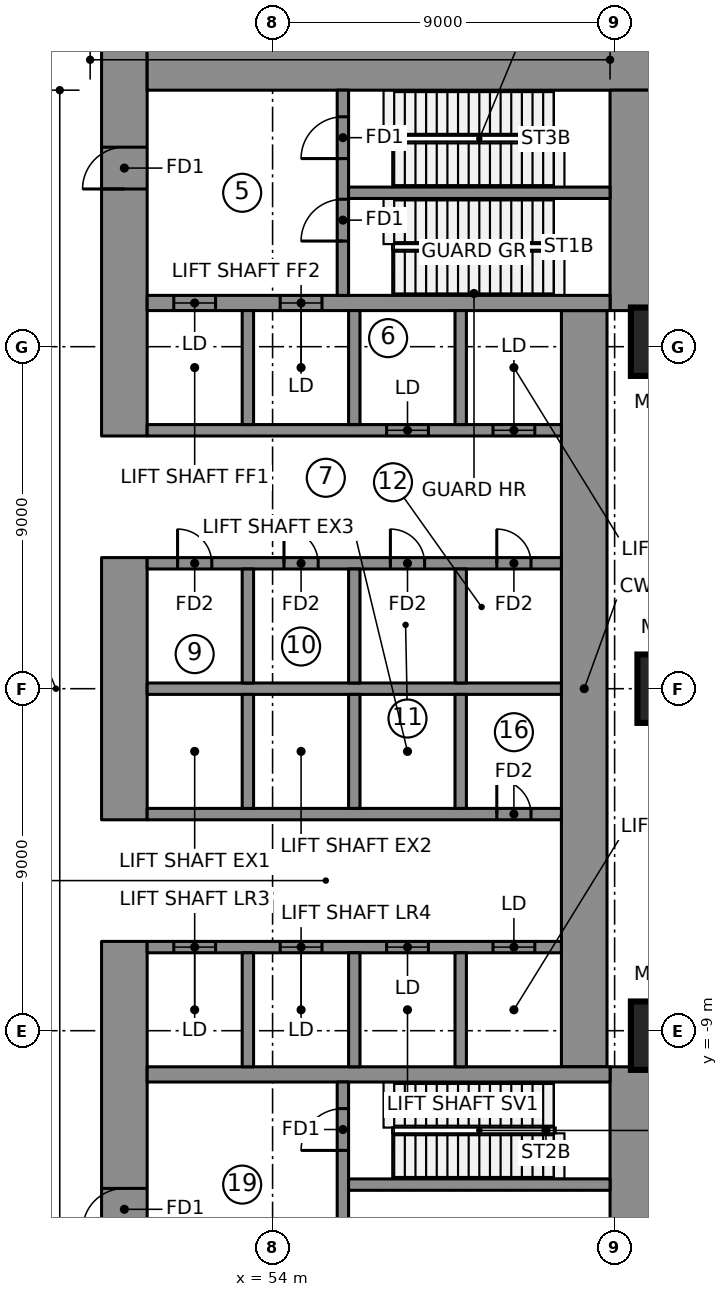
"""IFC4 building model, lengths in metres.
Left out: names, types, materials, properties, quantities, classifications, styles, units other than length and angle.
Written with IfcOpenShell. Run it as: python <this file> out.ifc"""

import sys

from ifc_helpers import new_model, si_unit, direction, frame, frame_2d, origin, origin_2d, place, context, subcontext, project, spatial, rectangle, extrude, element, fill, save


model = new_model("IFC4")
c1 = context("Model", 3, precision=1e-05, world=origin(), true_north=direction((0.0, 1.0)))
c2 = subcontext(c1, "Body", "Model", "MODEL_VIEW")
j1 = project(units=[si_unit("LENGTHUNIT", "METRE"), si_unit("PLANEANGLEUNIT", "RADIAN")], contexts=[c1])
p1 = place(None, origin())
s1 = spatial("IfcSite", under=j1, at=p1, CompositionType="ELEMENT")
p2 = place(p1, origin())
s2 = spatial("IfcBuilding", under=s1, at=p2, CompositionType="ELEMENT")
p3 = place(p2, frame((0.0, 0.0, 8.0)))
s3 = spatial("IfcBuildingStorey", under=s2, at=p3, CompositionType="ELEMENT", Elevation=8.0)
p4 = place(p3, frame((50.1, 6.65, 0.0), z_axis=(0.0, 0.0, 1.0), x_axis=(0.0, 1.0, 0.0)))
e1 = element("IfcWall", 1, at=p4, inside=s3, PredefinedType="SHEAR", context=c2, shape_type="SweptSolid", body=[
    extrude(rectangle(XDim=10.3, YDim=1.2, at=frame_2d((5.15, 0.0))), origin(), (0.0, 0.0, 1.0), 5.5),
])
p5 = place(p4, frame((6.5, 0.0, 0.0)))
e2 = element("IfcOpeningElement", 2, at=p5, cuts=e1, PredefinedType="OPENING", context=c2, shape_type="SweptSolid", body=[
    extrude(rectangle(XDim=1.1, YDim=2.1, at=frame_2d((0.55, 1.05))), frame((0.0, 0.61, 0.0), z_axis=(0.0, -1.0, 0.0), x_axis=(1.0, 0.0, 0.0)), (0.0, 0.0, 1.0), 1.22),
])
p6 = place(p3, frame((50.1, -3.45, 0.0), z_axis=(0.0, 0.0, 1.0), x_axis=(0.0, 1.0, 0.0)))
e3 = element("IfcWall", 3, at=p6, inside=s3, PredefinedType="SHEAR", context=c2, shape_type="SweptSolid", body=[
    extrude(rectangle(XDim=6.9, YDim=1.2, at=frame_2d((3.45, 0.0))), origin(), (0.0, 0.0, 1.0), 5.5),
])
p7 = place(p3, frame((50.1, -16.95, 0.0), z_axis=(0.0, 0.0, 1.0), x_axis=(0.0, 1.0, 0.0)))
e4 = element("IfcWall", 4, at=p7, inside=s3, PredefinedType="SHEAR", context=c2, shape_type="SweptSolid", body=[
    extrude(rectangle(XDim=10.3, YDim=1.2, at=frame_2d((5.15, 0.0))), origin(), (0.0, 0.0, 1.0), 5.5),
])
p8 = place(p7, frame((2.7, 0.0, 0.0)))
e5 = element("IfcOpeningElement", 5, at=p8, cuts=e4, PredefinedType="OPENING", context=c2, shape_type="SweptSolid", body=[
    extrude(rectangle(XDim=1.1, YDim=2.1, at=frame_2d((0.55, 1.05))), frame((0.0, 0.61, 0.0), z_axis=(0.0, -1.0, 0.0), x_axis=(1.0, 0.0, 0.0)), (0.0, 0.0, 1.0), 1.22),
])
p9 = place(p3, frame((50.7, 16.35, 0.0), z_axis=(0.0, 0.0, 1.0), x_axis=(1.0, 0.0, 0.0)))
e6 = element("IfcWall", 6, at=p9, inside=s3, PredefinedType="SHEAR", context=c2, shape_type="SweptSolid", body=[
    extrude(rectangle(XDim=13.38, YDim=1.2, at=frame_2d((6.69, 0.0))), origin(), (0.0, 0.0, 1.0), 5.5),
])
for number, where, z_axis, x_axis in (
    (7, (63.48, 9.95, 0.0), (0.0, 0.0, 1.0), (0.0, 1.0, 0.0)),
    (8, (63.48, -15.75, 0.0), (0.0, 0.0, 1.0), (0.0, 1.0, 0.0)),
):
    element("IfcWall", number, at=place(p3, frame(where, z_axis=z_axis, x_axis=x_axis)), inside=s3, PredefinedType="SHEAR", context=c2, shape_type="SweptSolid", body=[
        extrude(rectangle(XDim=5.8, YDim=1.2, at=frame_2d((2.9, 0.0))), origin(), (0.0, 0.0, 1.0), 5.5),
    ])
p10 = place(p3, frame((62.2, -9.95, 0.0), z_axis=(0.0, 0.0, 1.0), x_axis=(0.0, 1.0, 0.0)))
e9 = element("IfcWall", 9, at=p10, inside=s3, PredefinedType="SHEAR", context=c2, shape_type="SweptSolid", body=[
    extrude(rectangle(XDim=19.9, YDim=1.2, at=frame_2d((9.95, 0.0))), origin(), (0.0, 0.0, 1.0), 5.5),
])
p11 = place(p3, frame((50.7, 10.15, 0.0), z_axis=(0.0, 0.0, 1.0), x_axis=(1.0, 0.0, 0.0)))
e10 = element("IfcWall", 10, at=p11, inside=s3, PredefinedType="SHEAR", context=c2, shape_type="SweptSolid", body=[
    extrude(rectangle(XDim=12.18, YDim=0.4, at=frame_2d((6.09, 0.0))), origin(), (0.0, 0.0, 1.0), 5.5),
])
p12 = place(p11, frame((0.7, 0.0, 0.0)))
e11 = element("IfcOpeningElement", 11, at=p12, cuts=e10, PredefinedType="OPENING", context=c2, shape_type="SweptSolid", body=[
    extrude(rectangle(XDim=1.1, YDim=2.1, at=frame_2d((0.55, 1.05))), frame((0.0, 0.21, 0.0), z_axis=(0.0, -1.0, 0.0), x_axis=(1.0, 0.0, 0.0)), (0.0, 0.0, 1.0), 0.42),
])
p13 = place(p11, frame((3.5, 0.0, 0.0)))
e12 = element("IfcOpeningElement", 12, at=p13, cuts=e10, PredefinedType="OPENING", context=c2, shape_type="SweptSolid", body=[
    extrude(rectangle(XDim=1.1, YDim=2.1, at=frame_2d((0.55, 1.05))), frame((0.0, 0.21, 0.0), z_axis=(0.0, -1.0, 0.0), x_axis=(1.0, 0.0, 0.0)), (0.0, 0.0, 1.0), 0.42),
])
p14 = place(p3, frame((50.7, -10.15, 0.0), z_axis=(0.0, 0.0, 1.0), x_axis=(1.0, 0.0, 0.0)))
e13 = element("IfcWall", 13, at=p14, inside=s3, PredefinedType="SHEAR", context=c2, shape_type="SweptSolid", body=[
    extrude(rectangle(XDim=12.18, YDim=0.4, at=frame_2d((6.09, 0.0))), origin(), (0.0, 0.0, 1.0), 5.5),
])
p15 = place(p3, frame((50.7, 0.0, 0.0), z_axis=(0.0, 0.0, 1.0), x_axis=(1.0, 0.0, 0.0)))
e14 = element("IfcWall", 14, at=p15, inside=s3, PredefinedType="SHEAR", context=c2, shape_type="SweptSolid", body=[
    extrude(rectangle(XDim=10.9, YDim=0.3, at=frame_2d((5.45, 0.0))), origin(), (0.0, 0.0, 1.0), 5.5),
])
p16 = place(p3, frame((50.7, 3.3, 0.0), z_axis=(0.0, 0.0, 1.0), x_axis=(1.0, 0.0, 0.0)))
e15 = element("IfcWall", 15, at=p16, inside=s3, PredefinedType="SHEAR", context=c2, shape_type="SweptSolid", body=[
    extrude(rectangle(XDim=10.9, YDim=0.3, at=frame_2d((5.45, 0.0))), origin(), (0.0, 0.0, 1.0), 5.5),
])
p17 = place(p16, frame((0.8, 0.0, 0.0)))
e16 = element("IfcOpeningElement", 16, at=p17, cuts=e15, PredefinedType="OPENING", context=c2, shape_type="SweptSolid", body=[
    extrude(rectangle(XDim=0.9, YDim=2.1, at=frame_2d((0.45, 1.05))), frame((0.0, 0.16, 0.0), z_axis=(0.0, -1.0, 0.0), x_axis=(1.0, 0.0, 0.0)), (0.0, 0.0, 1.0), 0.32),
])
p18 = place(p16, frame((3.6, 0.0, 0.0)))
e17 = element("IfcOpeningElement", 17, at=p18, cuts=e15, PredefinedType="OPENING", context=c2, shape_type="SweptSolid", body=[
    extrude(rectangle(XDim=0.9, YDim=2.1, at=frame_2d((0.45, 1.05))), frame((0.0, 0.16, 0.0), z_axis=(0.0, -1.0, 0.0), x_axis=(1.0, 0.0, 0.0)), (0.0, 0.0, 1.0), 0.32),
])
p19 = place(p16, frame((6.4, 0.0, 0.0)))
e18 = element("IfcOpeningElement", 18, at=p19, cuts=e15, PredefinedType="OPENING", context=c2, shape_type="SweptSolid", body=[
    extrude(rectangle(XDim=0.9, YDim=2.1, at=frame_2d((0.45, 1.05))), frame((0.0, 0.16, 0.0), z_axis=(0.0, -1.0, 0.0), x_axis=(1.0, 0.0, 0.0)), (0.0, 0.0, 1.0), 0.32),
])
p20 = place(p16, frame((9.2, 0.0, 0.0)))
e19 = element("IfcOpeningElement", 19, at=p20, cuts=e15, PredefinedType="OPENING", context=c2, shape_type="SweptSolid", body=[
    extrude(rectangle(XDim=0.9, YDim=2.1, at=frame_2d((0.45, 1.05))), frame((0.0, 0.16, 0.0), z_axis=(0.0, -1.0, 0.0), x_axis=(1.0, 0.0, 0.0)), (0.0, 0.0, 1.0), 0.32),
])
p21 = place(p3, frame((50.7, 6.8, 0.0), z_axis=(0.0, 0.0, 1.0), x_axis=(1.0, 0.0, 0.0)))
e20 = element("IfcWall", 20, at=p21, inside=s3, PredefinedType="SHEAR", context=c2, shape_type="SweptSolid", body=[
    extrude(rectangle(XDim=10.9, YDim=0.3, at=frame_2d((5.45, 0.0))), origin(), (0.0, 0.0, 1.0), 5.5),
])
p22 = place(p21, frame((6.3, 0.0, 0.0)))
e21 = element("IfcOpeningElement", 21, at=p22, cuts=e20, PredefinedType="OPENING", context=c2, shape_type="SweptSolid", body=[
    extrude(rectangle(XDim=1.1, YDim=2.1, at=frame_2d((0.55, 1.05))), frame((0.0, 0.16, 0.0), z_axis=(0.0, -1.0, 0.0), x_axis=(1.0, 0.0, 0.0)), (0.0, 0.0, 1.0), 0.32),
])
p23 = place(p21, frame((9.1, 0.0, 0.0)))
e22 = element("IfcOpeningElement", 22, at=p23, cuts=e20, PredefinedType="OPENING", context=c2, shape_type="SweptSolid", body=[
    extrude(rectangle(XDim=1.1, YDim=2.1, at=frame_2d((0.55, 1.05))), frame((0.0, 0.16, 0.0), z_axis=(0.0, -1.0, 0.0), x_axis=(1.0, 0.0, 0.0)), (0.0, 0.0, 1.0), 0.32),
])
for number, where, z_axis, x_axis in (
    (23, (53.35, 0.15, 0.0), (0.0, 0.0, 1.0), (0.0, 1.0, 0.0)),
    (24, (53.35, 6.95, 0.0), (0.0, 0.0, 1.0), (0.0, 1.0, 0.0)),
    (25, (56.15, 0.15, 0.0), (0.0, 0.0, 1.0), (0.0, 1.0, 0.0)),
    (26, (56.15, 6.95, 0.0), (0.0, 0.0, 1.0), (0.0, 1.0, 0.0)),
    (27, (58.95, 0.15, 0.0), (0.0, 0.0, 1.0), (0.0, 1.0, 0.0)),
    (28, (58.95, 6.95, 0.0), (0.0, 0.0, 1.0), (0.0, 1.0, 0.0)),
):
    element("IfcWall", number, at=place(p3, frame(where, z_axis=z_axis, x_axis=x_axis)), inside=s3, PredefinedType="SHEAR", context=c2, shape_type="SweptSolid", body=[
        extrude(rectangle(XDim=3.0, YDim=0.3, at=frame_2d((1.5, 0.0))), origin(), (0.0, 0.0, 1.0), 5.5),
    ])
p24 = place(p3, frame((50.7, -3.3, 0.0), z_axis=(0.0, 0.0, 1.0), x_axis=(1.0, 0.0, 0.0)))
e29 = element("IfcWall", 29, at=p24, inside=s3, PredefinedType="SHEAR", context=c2, shape_type="SweptSolid", body=[
    extrude(rectangle(XDim=10.9, YDim=0.3, at=frame_2d((5.45, 0.0))), origin(), (0.0, 0.0, 1.0), 5.5),
])
p25 = place(p24, frame((9.2, 0.0, 0.0)))
e30 = element("IfcOpeningElement", 30, at=p25, cuts=e29, PredefinedType="OPENING", context=c2, shape_type="SweptSolid", body=[
    extrude(rectangle(XDim=0.9, YDim=2.1, at=frame_2d((0.45, 1.05))), frame((0.0, 0.16, 0.0), z_axis=(0.0, -1.0, 0.0), x_axis=(1.0, 0.0, 0.0)), (0.0, 0.0, 1.0), 0.32),
])
p26 = place(p3, frame((50.7, -6.8, 0.0), z_axis=(0.0, 0.0, 1.0), x_axis=(1.0, 0.0, 0.0)))
e31 = element("IfcWall", 31, at=p26, inside=s3, PredefinedType="SHEAR", context=c2, shape_type="SweptSolid", body=[
    extrude(rectangle(XDim=10.9, YDim=0.3, at=frame_2d((5.45, 0.0))), origin(), (0.0, 0.0, 1.0), 5.5),
])
p27 = place(p26, frame((0.7, 0.0, 0.0)))
e32 = element("IfcOpeningElement", 32, at=p27, cuts=e31, PredefinedType="OPENING", context=c2, shape_type="SweptSolid", body=[
    extrude(rectangle(XDim=1.1, YDim=2.1, at=frame_2d((0.55, 1.05))), frame((0.0, 0.16, 0.0), z_axis=(0.0, -1.0, 0.0), x_axis=(1.0, 0.0, 0.0)), (0.0, 0.0, 1.0), 0.32),
])
p28 = place(p26, frame((3.5, 0.0, 0.0)))
e33 = element("IfcOpeningElement", 33, at=p28, cuts=e31, PredefinedType="OPENING", context=c2, shape_type="SweptSolid", body=[
    extrude(rectangle(XDim=1.1, YDim=2.1, at=frame_2d((0.55, 1.05))), frame((0.0, 0.16, 0.0), z_axis=(0.0, -1.0, 0.0), x_axis=(1.0, 0.0, 0.0)), (0.0, 0.0, 1.0), 0.32),
])
p29 = place(p26, frame((6.3, 0.0, 0.0)))
e34 = element("IfcOpeningElement", 34, at=p29, cuts=e31, PredefinedType="OPENING", context=c2, shape_type="SweptSolid", body=[
    extrude(rectangle(XDim=1.1, YDim=2.1, at=frame_2d((0.55, 1.05))), frame((0.0, 0.16, 0.0), z_axis=(0.0, -1.0, 0.0), x_axis=(1.0, 0.0, 0.0)), (0.0, 0.0, 1.0), 0.32),
])
p30 = place(p26, frame((9.1, 0.0, 0.0)))
e35 = element("IfcOpeningElement", 35, at=p30, cuts=e31, PredefinedType="OPENING", context=c2, shape_type="SweptSolid", body=[
    extrude(rectangle(XDim=1.1, YDim=2.1, at=frame_2d((0.55, 1.05))), frame((0.0, 0.16, 0.0), z_axis=(0.0, -1.0, 0.0), x_axis=(1.0, 0.0, 0.0)), (0.0, 0.0, 1.0), 0.32),
])
for number, where, z_axis, x_axis in (
    (36, (53.35, -3.15, 0.0), (0.0, 0.0, 1.0), (0.0, 1.0, 0.0)),
    (37, (53.35, -9.95, 0.0), (0.0, 0.0, 1.0), (0.0, 1.0, 0.0)),
    (38, (56.15, -3.15, 0.0), (0.0, 0.0, 1.0), (0.0, 1.0, 0.0)),
    (39, (56.15, -9.95, 0.0), (0.0, 0.0, 1.0), (0.0, 1.0, 0.0)),
    (40, (58.95, -3.15, 0.0), (0.0, 0.0, 1.0), (0.0, 1.0, 0.0)),
    (41, (58.95, -9.95, 0.0), (0.0, 0.0, 1.0), (0.0, 1.0, 0.0)),
):
    element("IfcWall", number, at=place(p3, frame(where, z_axis=z_axis, x_axis=x_axis)), inside=s3, PredefinedType="SHEAR", context=c2, shape_type="SweptSolid", body=[
        extrude(rectangle(XDim=3.0, YDim=0.3, at=frame_2d((1.5, 0.0))), origin(), (0.0, 0.0, 1.0), 5.5),
    ])
p31 = place(p3, frame((55.85, 10.35, 0.0), z_axis=(0.0, 0.0, 1.0), x_axis=(0.0, 1.0, 0.0)))
e42 = element("IfcWall", 42, at=p31, inside=s3, PredefinedType="SHEAR", context=c2, shape_type="SweptSolid", body=[
    extrude(rectangle(XDim=5.4, YDim=0.3, at=frame_2d((2.7, 0.0))), origin(), (0.0, 0.0, 1.0), 5.5),
])
p32 = place(p31, frame((1.43, 0.0, 0.0)))
e43 = element("IfcOpeningElement", 43, at=p32, cuts=e42, PredefinedType="OPENING", context=c2, shape_type="SweptSolid", body=[
    extrude(rectangle(XDim=1.1, YDim=2.1, at=frame_2d((0.55, 1.05))), frame((0.0, 0.16, 0.0), z_axis=(0.0, -1.0, 0.0), x_axis=(1.0, 0.0, 0.0)), (0.0, 0.0, 1.0), 0.32),
])
p33 = place(p31, frame((3.6, 0.0, 0.0)))
e44 = element("IfcOpeningElement", 44, at=p33, cuts=e42, PredefinedType="OPENING", context=c2, shape_type="SweptSolid", body=[
    extrude(rectangle(XDim=1.1, YDim=2.1, at=frame_2d((0.55, 1.05))), frame((0.0, 0.16, 0.0), z_axis=(0.0, -1.0, 0.0), x_axis=(1.0, 0.0, 0.0)), (0.0, 0.0, 1.0), 0.32),
])
p34 = place(p3, frame((55.85, -15.75, 0.0), z_axis=(0.0, 0.0, 1.0), x_axis=(0.0, 1.0, 0.0)))
e45 = element("IfcWall", 45, at=p34, inside=s3, PredefinedType="SHEAR", context=c2, shape_type="SweptSolid", body=[
    extrude(rectangle(XDim=5.4, YDim=0.3, at=frame_2d((2.7, 0.0))), origin(), (0.0, 0.0, 1.0), 5.5),
])
p35 = place(p34, frame((3.6, 0.0, 0.0)))
e46 = element("IfcOpeningElement", 46, at=p35, cuts=e45, PredefinedType="OPENING", context=c2, shape_type="SweptSolid", body=[
    extrude(rectangle(XDim=1.1, YDim=2.1, at=frame_2d((0.55, 1.05))), frame((0.0, 0.16, 0.0), z_axis=(0.0, -1.0, 0.0), x_axis=(1.0, 0.0, 0.0)), (0.0, 0.0, 1.0), 0.32),
])
p36 = place(p34, frame((0.8, 0.0, 0.0)))
e47 = element("IfcOpeningElement", 47, at=p36, cuts=e45, PredefinedType="OPENING", context=c2, shape_type="SweptSolid", body=[
    extrude(rectangle(XDim=0.9, YDim=2.1, at=frame_2d((0.45, 1.05))), frame((0.0, 0.16, 0.0), z_axis=(0.0, -1.0, 0.0), x_axis=(1.0, 0.0, 0.0)), (0.0, 0.0, 1.0), 0.32),
])
for number, where, z_axis, x_axis in (
    (48, (56.0, 13.05, 0.0), (0.0, 0.0, 1.0), (1.0, 0.0, 0.0)),
    (49, (56.0, -13.05, 0.0), (0.0, 0.0, 1.0), (1.0, 0.0, 0.0)),
):
    element("IfcWall", number, at=place(p3, frame(where, z_axis=z_axis, x_axis=x_axis)), inside=s3, PredefinedType="SHEAR", context=c2, shape_type="SweptSolid", body=[
        extrude(rectangle(XDim=6.88, YDim=0.3, at=frame_2d((3.44, 0.0))), origin(), (0.0, 0.0, 1.0), 5.5),
    ])
for number, where, z_axis, x_axis in (
    (50, (64.328, -9.131, 0.0), (0.0, 0.0, 1.0), (1.0, 0.0, 0.0)),
    (51, (64.5, 0.0, 0.0), (0.0, 0.0, 1.0), (1.0, 0.0, 0.0)),
    (52, (64.328, 9.131, 0.0), (0.0, 0.0, 1.0), (1.0, 0.0, 0.0)),
):
    element("IfcColumn", number, at=place(p3, frame(where, z_axis=z_axis, x_axis=x_axis)), inside=s3, PredefinedType="COLUMN", context=c2, shape_type="SweptSolid", body=[
        extrude(rectangle(XDim=1.8, YDim=1.8, at=origin_2d()), origin(), (0.0, 0.0, 1.0), 5.5),
    ])
p37 = place(p12, origin())
e53 = element("IfcDoor", 53, at=p37, inside=s3, OperationType="DOUBLE_DOOR_SLIDING", PredefinedType="DOOR", context=c2, shape_type="SweptSolid", body=[
    extrude(rectangle(XDim=1.1, YDim=2.1, at=frame_2d((0.55, 1.05))), frame((0.0, 0.025, 0.0), z_axis=(0.0, -1.0, 0.0), x_axis=(1.0, 0.0, 0.0)), (0.0, 0.0, 1.0), 0.05),
])
fill(e11, e53)
p38 = place(p13, origin())
e54 = element("IfcDoor", 54, at=p38, inside=s3, OperationType="DOUBLE_DOOR_SLIDING", PredefinedType="DOOR", context=c2, shape_type="SweptSolid", body=[
    extrude(rectangle(XDim=1.1, YDim=2.1, at=frame_2d((0.55, 1.05))), frame((0.0, 0.025, 0.0), z_axis=(0.0, -1.0, 0.0), x_axis=(1.0, 0.0, 0.0)), (0.0, 0.0, 1.0), 0.05),
])
fill(e12, e54)
p39 = place(p22, origin())
e55 = element("IfcDoor", 55, at=p39, inside=s3, OperationType="DOUBLE_DOOR_SLIDING", PredefinedType="DOOR", context=c2, shape_type="SweptSolid", body=[
    extrude(rectangle(XDim=1.1, YDim=2.1, at=frame_2d((0.55, 1.05))), frame((0.0, 0.025, 0.0), z_axis=(0.0, -1.0, 0.0), x_axis=(1.0, 0.0, 0.0)), (0.0, 0.0, 1.0), 0.05),
])
fill(e21, e55)
p40 = place(p23, origin())
e56 = element("IfcDoor", 56, at=p40, inside=s3, OperationType="DOUBLE_DOOR_SLIDING", PredefinedType="DOOR", context=c2, shape_type="SweptSolid", body=[
    extrude(rectangle(XDim=1.1, YDim=2.1, at=frame_2d((0.55, 1.05))), frame((0.0, 0.025, 0.0), z_axis=(0.0, -1.0, 0.0), x_axis=(1.0, 0.0, 0.0)), (0.0, 0.0, 1.0), 0.05),
])
fill(e22, e56)
p41 = place(p27, origin())
e57 = element("IfcDoor", 57, at=p41, inside=s3, OperationType="DOUBLE_DOOR_SLIDING", PredefinedType="DOOR", context=c2, shape_type="SweptSolid", body=[
    extrude(rectangle(XDim=1.1, YDim=2.1, at=frame_2d((0.55, 1.05))), frame((0.0, 0.025, 0.0), z_axis=(0.0, -1.0, 0.0), x_axis=(1.0, 0.0, 0.0)), (0.0, 0.0, 1.0), 0.05),
])
fill(e32, e57)
p42 = place(p28, origin())
e58 = element("IfcDoor", 58, at=p42, inside=s3, OperationType="DOUBLE_DOOR_SLIDING", PredefinedType="DOOR", context=c2, shape_type="SweptSolid", body=[
    extrude(rectangle(XDim=1.1, YDim=2.1, at=frame_2d((0.55, 1.05))), frame((0.0, 0.025, 0.0), z_axis=(0.0, -1.0, 0.0), x_axis=(1.0, 0.0, 0.0)), (0.0, 0.0, 1.0), 0.05),
])
fill(e33, e58)
p43 = place(p29, origin())
e59 = element("IfcDoor", 59, at=p43, inside=s3, OperationType="DOUBLE_DOOR_SLIDING", PredefinedType="DOOR", context=c2, shape_type="SweptSolid", body=[
    extrude(rectangle(XDim=1.1, YDim=2.1, at=frame_2d((0.55, 1.05))), frame((0.0, 0.025, 0.0), z_axis=(0.0, -1.0, 0.0), x_axis=(1.0, 0.0, 0.0)), (0.0, 0.0, 1.0), 0.05),
])
fill(e34, e59)
p44 = place(p30, origin())
e60 = element("IfcDoor", 60, at=p44, inside=s3, OperationType="DOUBLE_DOOR_SLIDING", PredefinedType="DOOR", context=c2, shape_type="SweptSolid", body=[
    extrude(rectangle(XDim=1.1, YDim=2.1, at=frame_2d((0.55, 1.05))), frame((0.0, 0.025, 0.0), z_axis=(0.0, -1.0, 0.0), x_axis=(1.0, 0.0, 0.0)), (0.0, 0.0, 1.0), 0.05),
])
fill(e35, e60)
p45 = place(p32, origin())
e61 = element("IfcDoor", 61, at=p45, inside=s3, OperationType="SINGLE_SWING_RIGHT", PredefinedType="DOOR", context=c2, shape_type="SweptSolid", body=[
    extrude(rectangle(XDim=1.1, YDim=2.1, at=frame_2d((0.55, 1.05))), frame((0.0, 0.025, 0.0), z_axis=(0.0, -1.0, 0.0), x_axis=(1.0, 0.0, 0.0)), (0.0, 0.0, 1.0), 0.05),
])
fill(e43, e61)
p46 = place(p33, origin())
e62 = element("IfcDoor", 62, at=p46, inside=s3, OperationType="SINGLE_SWING_RIGHT", PredefinedType="DOOR", context=c2, shape_type="SweptSolid", body=[
    extrude(rectangle(XDim=1.1, YDim=2.1, at=frame_2d((0.55, 1.05))), frame((0.0, 0.025, 0.0), z_axis=(0.0, -1.0, 0.0), x_axis=(1.0, 0.0, 0.0)), (0.0, 0.0, 1.0), 0.05),
])
fill(e44, e62)
p47 = place(p35, origin())
e63 = element("IfcDoor", 63, at=p47, inside=s3, OperationType="SINGLE_SWING_RIGHT", PredefinedType="DOOR", context=c2, shape_type="SweptSolid", body=[
    extrude(rectangle(XDim=1.1, YDim=2.1, at=frame_2d((0.55, 1.05))), frame((0.0, 0.025, 0.0), z_axis=(0.0, -1.0, 0.0), x_axis=(1.0, 0.0, 0.0)), (0.0, 0.0, 1.0), 0.05),
])
fill(e46, e63)
p48 = place(p5, origin())
e64 = element("IfcDoor", 64, at=p48, inside=s3, OperationType="SINGLE_SWING_RIGHT", PredefinedType="DOOR", context=c2, shape_type="SweptSolid", body=[
    extrude(rectangle(XDim=1.1, YDim=2.1, at=frame_2d((0.55, 1.05))), frame((0.0, 0.025, 0.0), z_axis=(0.0, -1.0, 0.0), x_axis=(1.0, 0.0, 0.0)), (0.0, 0.0, 1.0), 0.05),
])
fill(e2, e64)
p49 = place(p8, origin())
e65 = element("IfcDoor", 65, at=p49, inside=s3, OperationType="SINGLE_SWING_RIGHT", PredefinedType="DOOR", context=c2, shape_type="SweptSolid", body=[
    extrude(rectangle(XDim=1.1, YDim=2.1, at=frame_2d((0.55, 1.05))), frame((0.0, 0.025, 0.0), z_axis=(0.0, -1.0, 0.0), x_axis=(1.0, 0.0, 0.0)), (0.0, 0.0, 1.0), 0.05),
])
fill(e5, e65)
p50 = place(p17, origin())
e66 = element("IfcDoor", 66, at=p50, inside=s3, OperationType="SINGLE_SWING_LEFT", PredefinedType="DOOR", context=c2, shape_type="SweptSolid", body=[
    extrude(rectangle(XDim=0.9, YDim=2.1, at=frame_2d((0.45, 1.05))), frame((0.0, 0.025, 0.0), z_axis=(0.0, -1.0, 0.0), x_axis=(1.0, 0.0, 0.0)), (0.0, 0.0, 1.0), 0.05),
])
fill(e16, e66)
p51 = place(p18, origin())
e67 = element("IfcDoor", 67, at=p51, inside=s3, OperationType="SINGLE_SWING_LEFT", PredefinedType="DOOR", context=c2, shape_type="SweptSolid", body=[
    extrude(rectangle(XDim=0.9, YDim=2.1, at=frame_2d((0.45, 1.05))), frame((0.0, 0.025, 0.0), z_axis=(0.0, -1.0, 0.0), x_axis=(1.0, 0.0, 0.0)), (0.0, 0.0, 1.0), 0.05),
])
fill(e17, e67)
p52 = place(p19, origin())
e68 = element("IfcDoor", 68, at=p52, inside=s3, OperationType="SINGLE_SWING_LEFT", PredefinedType="DOOR", context=c2, shape_type="SweptSolid", body=[
    extrude(rectangle(XDim=0.9, YDim=2.1, at=frame_2d((0.45, 1.05))), frame((0.0, 0.025, 0.0), z_axis=(0.0, -1.0, 0.0), x_axis=(1.0, 0.0, 0.0)), (0.0, 0.0, 1.0), 0.05),
])
fill(e18, e68)
p53 = place(p20, origin())
e69 = element("IfcDoor", 69, at=p53, inside=s3, OperationType="SINGLE_SWING_LEFT", PredefinedType="DOOR", context=c2, shape_type="SweptSolid", body=[
    extrude(rectangle(XDim=0.9, YDim=2.1, at=frame_2d((0.45, 1.05))), frame((0.0, 0.025, 0.0), z_axis=(0.0, -1.0, 0.0), x_axis=(1.0, 0.0, 0.0)), (0.0, 0.0, 1.0), 0.05),
])
fill(e19, e69)
p54 = place(p25, origin())
e70 = element("IfcDoor", 70, at=p54, inside=s3, OperationType="SINGLE_SWING_LEFT", PredefinedType="DOOR", context=c2, shape_type="SweptSolid", body=[
    extrude(rectangle(XDim=0.9, YDim=2.1, at=frame_2d((0.45, 1.05))), frame((0.0, 0.025, 0.0), z_axis=(0.0, -1.0, 0.0), x_axis=(1.0, 0.0, 0.0)), (0.0, 0.0, 1.0), 0.05),
])
fill(e30, e70)
save(model, sys.argv[1])
